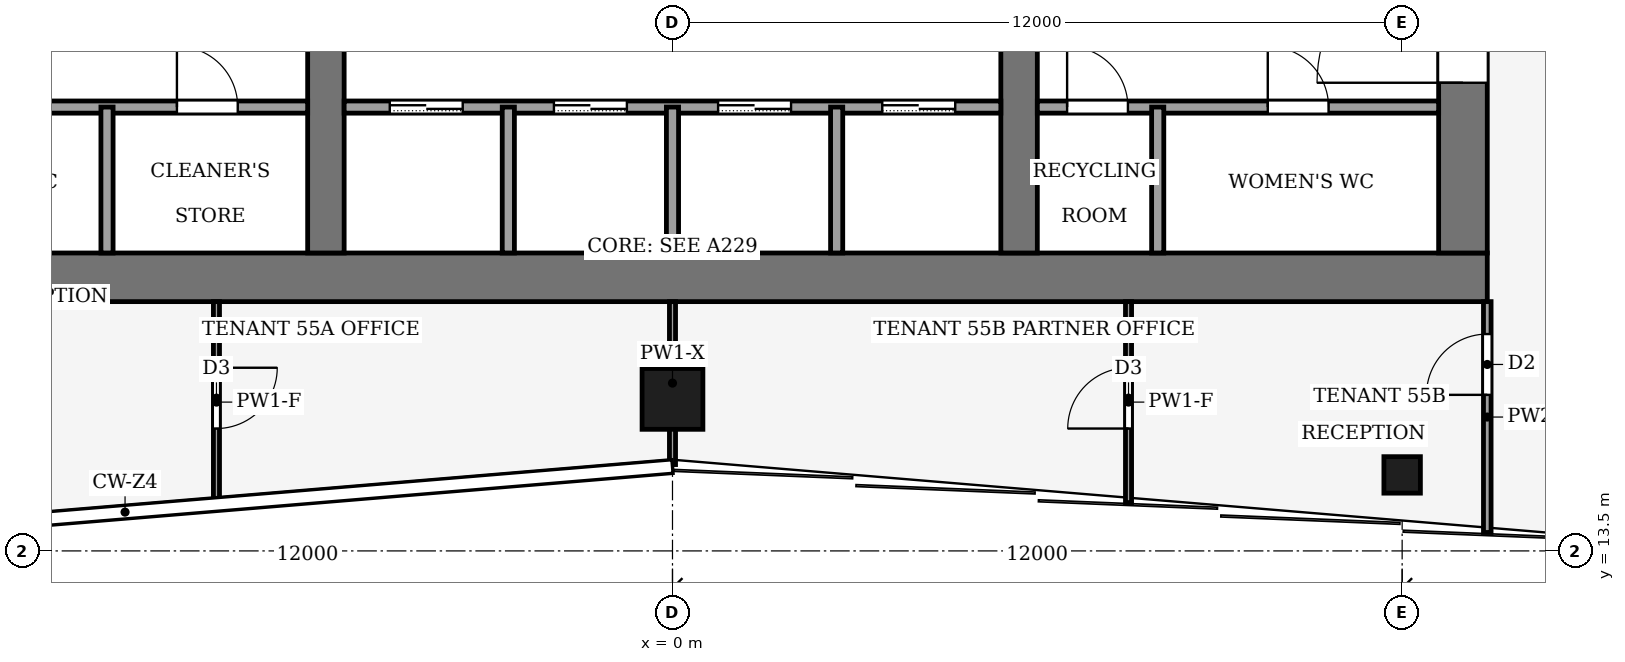
"""IFC4 building model, lengths in metres.
Left out: names, types, materials, properties, quantities, classifications, styles, units other than length and angle.
Written with IfcOpenShell. Run it as: python <this file> out.ifc"""

import sys

from ifc_helpers import new_model, si_unit, direction, frame, frame_2d, origin, origin_2d, place, context, subcontext, project, spatial, rectangle, hollow_rectangle, extrude, element, fill, save


model = new_model("IFC4")
c1 = context("Model", 3, precision=1e-05, world=origin(), true_north=direction((0.0, 1.0)))
c2 = subcontext(c1, "Body", "Model", "MODEL_VIEW")
j1 = project(units=[si_unit("LENGTHUNIT", "METRE"), si_unit("PLANEANGLEUNIT", "RADIAN")], contexts=[c1])
p1 = place(None, origin())
s1 = spatial("IfcSite", under=j1, at=p1, CompositionType="ELEMENT")
p2 = place(p1, origin())
s2 = spatial("IfcBuilding", under=s1, at=p2, CompositionType="ELEMENT")
p3 = place(p2, frame((0.0, 0.0, 242.0)))
s3 = spatial("IfcBuildingStorey", under=s2, at=p3, CompositionType="ELEMENT", Elevation=242.0)
p4 = place(p3, frame((-13.4, 18.0, -0.13), z_axis=(0.0, 0.0, 1.0), x_axis=(1.0, 0.0, 0.0)))
e1 = element("IfcWall", 1, at=p4, inside=s3, PredefinedType="SHEAR", context=c2, shape_type="SweptSolid", body=[
    extrude(rectangle(XDim=26.8, YDim=0.8, at=frame_2d((13.4, 0.0))), origin(), (0.0, 0.0, 1.0), 4.0),
])
p5 = place(p3, frame((13.0, 18.4, -0.13), z_axis=(0.0, 0.0, 1.0), x_axis=(0.0, 1.0, 0.0)))
e2 = element("IfcWall", 2, at=p5, inside=s3, PredefinedType="SHEAR", context=c2, shape_type="SweptSolid", body=[
    extrude(rectangle(XDim=19.2, YDim=0.8, at=frame_2d((9.6, 0.0))), origin(), (0.0, 0.0, 1.0), 4.0),
])
p6 = place(p5, frame((2.8, 0.0, 0.13)))
e3 = element("IfcOpeningElement", 3, at=p6, cuts=e2, PredefinedType="OPENING", context=c2, shape_type="SweptSolid", body=[
    extrude(rectangle(XDim=2.4, YDim=2.4, at=frame_2d((1.2, 1.2))), frame((0.0, 0.41, 0.0), z_axis=(0.0, -1.0, 0.0), x_axis=(1.0, 0.0, 0.0)), (0.0, 0.0, 1.0), 0.82),
])
p7 = place(p5, frame((13.3, 0.0, 0.13)))
e4 = element("IfcOpeningElement", 4, at=p7, cuts=e2, PredefinedType="OPENING", context=c2, shape_type="SweptSolid", body=[
    extrude(rectangle(XDim=2.4, YDim=2.4, at=frame_2d((1.2, 1.2))), frame((0.0, 0.41, 0.0), z_axis=(0.0, -1.0, 0.0), x_axis=(1.0, 0.0, 0.0)), (0.0, 0.0, 1.0), 0.82),
])
p8 = place(p3, frame((-5.7, 18.4, -0.13), z_axis=(0.0, 0.0, 1.0), x_axis=(0.0, 1.0, 0.0)))
e5 = element("IfcWall", 5, at=p8, inside=s3, PredefinedType="SHEAR", context=c2, shape_type="SweptSolid", body=[
    extrude(rectangle(XDim=19.2, YDim=0.6, at=frame_2d((9.6, 0.0))), origin(), (0.0, 0.0, 1.0), 4.0),
])
p9 = place(p8, frame((8.35, 0.0, 0.13)))
e6 = element("IfcOpeningElement", 6, at=p9, cuts=e5, PredefinedType="OPENING", context=c2, shape_type="SweptSolid", body=[
    extrude(rectangle(XDim=0.9, YDim=2.1, at=frame_2d((0.45, 1.05))), frame((0.0, 0.31, 0.0), z_axis=(0.0, -1.0, 0.0), x_axis=(1.0, 0.0, 0.0)), (0.0, 0.0, 1.0), 0.62),
])
p10 = place(p3, frame((5.7, 18.4, -0.13), z_axis=(0.0, 0.0, 1.0), x_axis=(0.0, 1.0, 0.0)))
e7 = element("IfcWall", 7, at=p10, inside=s3, PredefinedType="SHEAR", context=c2, shape_type="SweptSolid", body=[
    extrude(rectangle(XDim=19.2, YDim=0.6, at=frame_2d((9.6, 0.0))), origin(), (0.0, 0.0, 1.0), 4.0),
])
p11 = place(p10, frame((8.35, 0.0, 0.13)))
e8 = element("IfcOpeningElement", 8, at=p11, cuts=e7, PredefinedType="OPENING", context=c2, shape_type="SweptSolid", body=[
    extrude(rectangle(XDim=0.9, YDim=2.1, at=frame_2d((0.45, 1.05))), frame((0.0, 0.31, 0.0), z_axis=(0.0, -1.0, 0.0), x_axis=(1.0, 0.0, 0.0)), (0.0, 0.0, 1.0), 0.62),
])
p12 = place(p10, frame((13.3, 0.0, 0.13)))
e9 = element("IfcOpeningElement", 9, at=p12, cuts=e7, PredefinedType="OPENING", context=c2, shape_type="SweptSolid", body=[
    extrude(rectangle(XDim=2.4, YDim=2.4, at=frame_2d((1.2, 1.2))), frame((0.0, 0.31, 0.0), z_axis=(0.0, -1.0, 0.0), x_axis=(1.0, 0.0, 0.0)), (0.0, 0.0, 1.0), 0.62),
])
p13 = place(p3, frame((0.0, 16.0, 0.0), z_axis=(0.0, 0.0, 1.0), x_axis=(1.0, 0.0, 0.0)))
e10 = element("IfcColumn", 10, at=p13, inside=s3, PredefinedType="COLUMN", context=c2, shape_type="SweptSolid", body=[
    extrude(hollow_rectangle(XDim=1.0, YDim=1.0, WallThickness=0.045, at=origin_2d()), origin(), (0.0, 0.0, 1.0), 4.0),
])
p14 = place(p3, frame((12.0, 14.75, 0.0), z_axis=(0.0, 0.0, 1.0), x_axis=(1.0, 0.0, 0.0)))
e11 = element("IfcColumn", 11, at=p14, inside=s3, PredefinedType="COLUMN", context=c2, shape_type="SweptSolid", body=[
    extrude(hollow_rectangle(XDim=0.6, YDim=0.6, WallThickness=0.025, at=origin_2d()), origin(), (0.0, 0.0, 1.0), 4.0),
])
p15 = place(p3, frame((-12.6, 20.8, 0.0), z_axis=(0.0, 0.0, 1.0), x_axis=(1.0, 0.0, 0.0)))
e12 = element("IfcWall", 12, at=p15, inside=s3, PredefinedType="PARTITIONING", context=c2, shape_type="SweptSolid", body=[
    extrude(rectangle(XDim=6.6, YDim=0.2, at=frame_2d((3.3, 0.0))), origin(), (0.0, 0.0, 1.0), 3.87),
])
p16 = place(p15, frame((1.15, 0.0, 0.0)))
e13 = element("IfcOpeningElement", 13, at=p16, cuts=e12, PredefinedType="OPENING", context=c2, shape_type="SweptSolid", body=[
    extrude(rectangle(XDim=1.0, YDim=2.1, at=frame_2d((0.5, 1.05))), frame((0.0, 0.11, 0.0), z_axis=(0.0, -1.0, 0.0), x_axis=(1.0, 0.0, 0.0)), (0.0, 0.0, 1.0), 0.22),
])
p17 = place(p15, frame((4.45, 0.0, 0.0)))
e14 = element("IfcOpeningElement", 14, at=p17, cuts=e12, PredefinedType="OPENING", context=c2, shape_type="SweptSolid", body=[
    extrude(rectangle(XDim=1.0, YDim=2.1, at=frame_2d((0.5, 1.05))), frame((0.0, 0.11, 0.0), z_axis=(0.0, -1.0, 0.0), x_axis=(1.0, 0.0, 0.0)), (0.0, 0.0, 1.0), 0.22),
])
p18 = place(p3, frame((-5.4, 20.8, 0.0), z_axis=(0.0, 0.0, 1.0), x_axis=(1.0, 0.0, 0.0)))
e15 = element("IfcWall", 15, at=p18, inside=s3, PredefinedType="PARTITIONING", context=c2, shape_type="SweptSolid", body=[
    extrude(rectangle(XDim=10.8, YDim=0.2, at=frame_2d((5.4, 0.0))), origin(), (0.0, 0.0, 1.0), 3.87),
])
p19 = place(p18, frame((0.75, 0.0, 0.0)))
e16 = element("IfcOpeningElement", 16, at=p19, cuts=e15, PredefinedType="OPENING", context=c2, shape_type="SweptSolid", body=[
    extrude(rectangle(XDim=1.2, YDim=2.2, at=frame_2d((0.6, 1.1))), frame((0.0, 0.11, 0.0), z_axis=(0.0, -1.0, 0.0), x_axis=(1.0, 0.0, 0.0)), (0.0, 0.0, 1.0), 0.22),
])
p20 = place(p18, frame((3.45, 0.0, 0.0)))
e17 = element("IfcOpeningElement", 17, at=p20, cuts=e15, PredefinedType="OPENING", context=c2, shape_type="SweptSolid", body=[
    extrude(rectangle(XDim=1.2, YDim=2.2, at=frame_2d((0.6, 1.1))), frame((0.0, 0.11, 0.0), z_axis=(0.0, -1.0, 0.0), x_axis=(1.0, 0.0, 0.0)), (0.0, 0.0, 1.0), 0.22),
])
p21 = place(p18, frame((6.15, 0.0, 0.0)))
e18 = element("IfcOpeningElement", 18, at=p21, cuts=e15, PredefinedType="OPENING", context=c2, shape_type="SweptSolid", body=[
    extrude(rectangle(XDim=1.2, YDim=2.2, at=frame_2d((0.6, 1.1))), frame((0.0, 0.11, 0.0), z_axis=(0.0, -1.0, 0.0), x_axis=(1.0, 0.0, 0.0)), (0.0, 0.0, 1.0), 0.22),
])
p22 = place(p18, frame((8.85, 0.0, 0.0)))
e19 = element("IfcOpeningElement", 19, at=p22, cuts=e15, PredefinedType="OPENING", context=c2, shape_type="SweptSolid", body=[
    extrude(rectangle(XDim=1.2, YDim=2.2, at=frame_2d((0.6, 1.1))), frame((0.0, 0.11, 0.0), z_axis=(0.0, -1.0, 0.0), x_axis=(1.0, 0.0, 0.0)), (0.0, 0.0, 1.0), 0.22),
])
p23 = place(p3, frame((6.0, 20.8, 0.0), z_axis=(0.0, 0.0, 1.0), x_axis=(1.0, 0.0, 0.0)))
e20 = element("IfcWall", 20, at=p23, inside=s3, PredefinedType="PARTITIONING", context=c2, shape_type="SweptSolid", body=[
    extrude(rectangle(XDim=6.6, YDim=0.2, at=frame_2d((3.3, 0.0))), origin(), (0.0, 0.0, 1.0), 3.87),
])
p24 = place(p23, frame((0.49, 0.0, 0.0)))
e21 = element("IfcOpeningElement", 21, at=p24, cuts=e20, PredefinedType="OPENING", context=c2, shape_type="SweptSolid", body=[
    extrude(rectangle(XDim=1.0, YDim=2.1, at=frame_2d((0.5, 1.05))), frame((0.0, 0.11, 0.0), z_axis=(0.0, -1.0, 0.0), x_axis=(1.0, 0.0, 0.0)), (0.0, 0.0, 1.0), 0.22),
])
p25 = place(p23, frame((3.79, 0.0, 0.0)))
e22 = element("IfcOpeningElement", 22, at=p25, cuts=e20, PredefinedType="OPENING", context=c2, shape_type="SweptSolid", body=[
    extrude(rectangle(XDim=1.0, YDim=2.1, at=frame_2d((0.5, 1.05))), frame((0.0, 0.11, 0.0), z_axis=(0.0, -1.0, 0.0), x_axis=(1.0, 0.0, 0.0)), (0.0, 0.0, 1.0), 0.22),
])
for number, where, z_axis, x_axis in (
    (23, (-9.3, 18.4, 0.0), (0.0, 0.0, 1.0), (0.0, 1.0, 0.0)),
    (24, (-2.7, 18.4, 0.0), (0.0, 0.0, 1.0), (0.0, 1.0, 0.0)),
    (25, (0.0, 18.4, 0.0), (0.0, 0.0, 1.0), (0.0, 1.0, 0.0)),
    (26, (2.7, 18.4, 0.0), (0.0, 0.0, 1.0), (0.0, 1.0, 0.0)),
    (27, (7.98, 18.4, 0.0), (0.0, 0.0, 1.0), (0.0, 1.0, 0.0)),
):
    element("IfcWall", number, at=place(p3, frame(where, z_axis=z_axis, x_axis=x_axis)), inside=s3, PredefinedType="PARTITIONING", context=c2, shape_type="SweptSolid", body=[
        extrude(rectangle(XDim=2.4, YDim=0.2, at=frame_2d((1.2, 0.0))), origin(), (0.0, 0.0, 1.0), 3.87),
    ])
p26 = place(p3, frame((13.4, 13.803, 0.0), z_axis=(0.0, 0.0, 1.0), x_axis=(0.0, 1.0, 0.0)))
e28 = element("IfcWall", 28, at=p26, inside=s3, PredefinedType="PARTITIONING", context=c2, shape_type="SweptSolid", body=[
    extrude(rectangle(XDim=3.797, YDim=0.125, at=frame_2d((1.898, 0.0))), origin(), (0.0, 0.0, 1.0), 3.04),
])
p27 = place(p26, frame((2.263, 0.0, 0.0)))
e29 = element("IfcOpeningElement", 29, at=p27, cuts=e28, PredefinedType="OPENING", context=c2, shape_type="SweptSolid", body=[
    extrude(rectangle(XDim=1.0, YDim=2.1, at=frame_2d((0.5, 1.05))), frame((0.0, 0.073, 0.0), z_axis=(0.0, -1.0, 0.0), x_axis=(1.0, 0.0, 0.0)), (0.0, 0.0, 1.0), 0.145),
])
p28 = place(p3, frame((-7.5, 17.6, 0.0), z_axis=(0.0, 0.0, 1.0), x_axis=(0.0, -1.0, 0.0)))
e30 = element("IfcWall", 30, at=p28, inside=s3, PredefinedType="PARTITIONING", context=c2, shape_type="SweptSolid", body=[
    extrude(rectangle(XDim=3.305, YDim=0.1, at=frame_2d((1.653, 0.0))), origin(), (0.0, 0.0, 1.0), 3.04),
])
p29 = place(p28, frame((1.087, 0.0, 0.0)))
e31 = element("IfcOpeningElement", 31, at=p29, cuts=e30, PredefinedType="OPENING", context=c2, shape_type="SweptSolid", body=[
    extrude(rectangle(XDim=1.0, YDim=2.1, at=frame_2d((0.5, 1.05))), frame((0.0, 0.06, 0.0), z_axis=(0.0, -1.0, 0.0), x_axis=(1.0, 0.0, 0.0)), (0.0, 0.0, 1.0), 0.12),
])
p30 = place(p3, frame((0.0, 14.92, 0.0), z_axis=(0.0, 0.0, 1.0), x_axis=(0.0, 1.0, 0.0)))
e32 = element("IfcWall", 32, at=p30, inside=s3, PredefinedType="PARTITIONING", context=c2, shape_type="SweptSolid", body=[
    extrude(rectangle(XDim=2.68, YDim=0.1, at=frame_2d((1.34, 0.0))), origin(), (0.0, 0.0, 1.0), 3.54),
])
p31 = place(p3, frame((7.5, 14.295, 0.0), z_axis=(0.0, 0.0, 1.0), x_axis=(0.0, 1.0, 0.0)))
e33 = element("IfcWall", 33, at=p31, inside=s3, PredefinedType="PARTITIONING", context=c2, shape_type="SweptSolid", body=[
    extrude(rectangle(XDim=3.305, YDim=0.1, at=frame_2d((1.653, 0.0))), origin(), (0.0, 0.0, 1.0), 3.04),
])
p32 = place(p31, frame((1.218, 0.0, 0.0)))
e34 = element("IfcOpeningElement", 34, at=p32, cuts=e33, PredefinedType="OPENING", context=c2, shape_type="SweptSolid", body=[
    extrude(rectangle(XDim=1.0, YDim=2.1, at=frame_2d((0.5, 1.05))), frame((0.0, 0.06, 0.0), z_axis=(0.0, -1.0, 0.0), x_axis=(1.0, 0.0, 0.0)), (0.0, 0.0, 1.0), 0.12),
])
p33 = place(p19, origin())
e35 = element("IfcDoor", 35, at=p33, inside=s3, OperationType="SLIDING_TO_LEFT", PredefinedType="DOOR", context=c2, shape_type="SweptSolid", body=[
    extrude(rectangle(XDim=1.2, YDim=2.2, at=frame_2d((0.6, 1.1))), frame((0.0, 0.025, 0.0), z_axis=(0.0, -1.0, 0.0), x_axis=(1.0, 0.0, 0.0)), (0.0, 0.0, 1.0), 0.05),
])
fill(e16, e35)
p34 = place(p20, origin())
e36 = element("IfcDoor", 36, at=p34, inside=s3, OperationType="SLIDING_TO_LEFT", PredefinedType="DOOR", context=c2, shape_type="SweptSolid", body=[
    extrude(rectangle(XDim=1.2, YDim=2.2, at=frame_2d((0.6, 1.1))), frame((0.0, 0.025, 0.0), z_axis=(0.0, -1.0, 0.0), x_axis=(1.0, 0.0, 0.0)), (0.0, 0.0, 1.0), 0.05),
])
fill(e17, e36)
p35 = place(p21, origin())
e37 = element("IfcDoor", 37, at=p35, inside=s3, OperationType="SLIDING_TO_LEFT", PredefinedType="DOOR", context=c2, shape_type="SweptSolid", body=[
    extrude(rectangle(XDim=1.2, YDim=2.2, at=frame_2d((0.6, 1.1))), frame((0.0, 0.025, 0.0), z_axis=(0.0, -1.0, 0.0), x_axis=(1.0, 0.0, 0.0)), (0.0, 0.0, 1.0), 0.05),
])
fill(e18, e37)
p36 = place(p22, origin())
e38 = element("IfcDoor", 38, at=p36, inside=s3, OperationType="SLIDING_TO_LEFT", PredefinedType="DOOR", context=c2, shape_type="SweptSolid", body=[
    extrude(rectangle(XDim=1.2, YDim=2.2, at=frame_2d((0.6, 1.1))), frame((0.0, 0.025, 0.0), z_axis=(0.0, -1.0, 0.0), x_axis=(1.0, 0.0, 0.0)), (0.0, 0.0, 1.0), 0.05),
])
fill(e19, e38)
p37 = place(p17, origin())
e39 = element("IfcDoor", 39, at=p37, inside=s3, OperationType="SINGLE_SWING_LEFT", PredefinedType="DOOR", context=c2, shape_type="SweptSolid", body=[
    extrude(rectangle(XDim=1.0, YDim=2.1, at=frame_2d((0.5, 1.05))), frame((0.0, 0.025, 0.0), z_axis=(0.0, -1.0, 0.0), x_axis=(1.0, 0.0, 0.0)), (0.0, 0.0, 1.0), 0.05),
])
fill(e14, e39)
p38 = place(p24, origin())
e40 = element("IfcDoor", 40, at=p38, inside=s3, OperationType="SINGLE_SWING_RIGHT", PredefinedType="DOOR", context=c2, shape_type="SweptSolid", body=[
    extrude(rectangle(XDim=1.0, YDim=2.1, at=frame_2d((0.5, 1.05))), frame((0.0, 0.025, 0.0), z_axis=(0.0, -1.0, 0.0), x_axis=(1.0, 0.0, 0.0)), (0.0, 0.0, 1.0), 0.05),
])
fill(e21, e40)
p39 = place(p25, origin())
e41 = element("IfcDoor", 41, at=p39, inside=s3, OperationType="SINGLE_SWING_RIGHT", PredefinedType="DOOR", context=c2, shape_type="SweptSolid", body=[
    extrude(rectangle(XDim=1.0, YDim=2.1, at=frame_2d((0.5, 1.05))), frame((0.0, 0.025, 0.0), z_axis=(0.0, -1.0, 0.0), x_axis=(1.0, 0.0, 0.0)), (0.0, 0.0, 1.0), 0.05),
])
fill(e22, e41)
p40 = place(p6, origin())
e42 = element("IfcDoor", 42, at=p40, inside=s3, OperationType="DOUBLE_DOOR_SINGLE_SWING", PredefinedType="DOOR", context=c2, shape_type="SweptSolid", body=[
    extrude(rectangle(XDim=2.4, YDim=2.4, at=frame_2d((1.2, 1.2))), frame((0.0, 0.025, 0.0), z_axis=(0.0, -1.0, 0.0), x_axis=(1.0, 0.0, 0.0)), (0.0, 0.0, 1.0), 0.05),
])
fill(e3, e42)
p41 = place(p27, origin())
e43 = element("IfcDoor", 43, at=p41, inside=s3, OperationType="SINGLE_SWING_RIGHT", PredefinedType="DOOR", context=c2, shape_type="SweptSolid", body=[
    extrude(rectangle(XDim=1.0, YDim=2.1, at=frame_2d((0.5, 1.05))), frame((0.0, 0.025, 0.0), z_axis=(0.0, -1.0, 0.0), x_axis=(1.0, 0.0, 0.0)), (0.0, 0.0, 1.0), 0.05),
])
fill(e29, e43)
p42 = place(p29, origin())
e44 = element("IfcDoor", 44, at=p42, inside=s3, OperationType="SINGLE_SWING_LEFT", PredefinedType="DOOR", context=c2, shape_type="SweptSolid", body=[
    extrude(rectangle(XDim=1.0, YDim=2.1, at=frame_2d((0.5, 1.05))), frame((0.0, 0.025, 0.0), z_axis=(0.0, -1.0, 0.0), x_axis=(1.0, 0.0, 0.0)), (0.0, 0.0, 1.0), 0.05),
])
fill(e31, e44)
p43 = place(p32, origin())
e45 = element("IfcDoor", 45, at=p43, inside=s3, OperationType="SINGLE_SWING_RIGHT", PredefinedType="DOOR", context=c2, shape_type="SweptSolid", body=[
    extrude(rectangle(XDim=1.0, YDim=2.1, at=frame_2d((0.5, 1.05))), frame((0.0, 0.025, 0.0), z_axis=(0.0, -1.0, 0.0), x_axis=(1.0, 0.0, 0.0)), (0.0, 0.0, 1.0), 0.05),
])
fill(e34, e45)
save(model, sys.argv[1])
